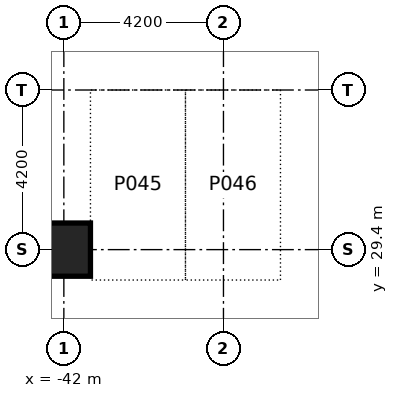
"""IFC4 building model, lengths in metres.
Left out: names, types, materials, properties, quantities, classifications, styles, units other than length and angle.
Written with IfcOpenShell. Run it as: python <this file> out.ifc"""

import sys

from ifc_helpers import new_model, si_unit, direction, frame, origin, origin_2d, place, context, subcontext, project, spatial, rectangle, extrude, element, save


model = new_model("IFC4")
c1 = context("Model", 3, precision=1e-05, world=origin(), true_north=direction((0.0, 1.0)))
c2 = subcontext(c1, "Body", "Model", "MODEL_VIEW")
j1 = project(units=[si_unit("LENGTHUNIT", "METRE"), si_unit("PLANEANGLEUNIT", "RADIAN")], contexts=[c1])
p1 = place(None, origin())
s1 = spatial("IfcSite", under=j1, at=p1, CompositionType="ELEMENT")
p2 = place(p1, origin())
s2 = spatial("IfcBuilding", under=s1, at=p2, CompositionType="ELEMENT")
p3 = place(p2, frame((0.0, 0.0, -4.2)))
s3 = spatial("IfcBuildingStorey", under=s2, at=p3, CompositionType="ELEMENT", Elevation=-4.2)
p4 = place(p3, frame((-42.0, 29.4, 0.0), z_axis=(0.0, 0.0, 1.0), x_axis=(1.0, 0.0, 0.0)))
e1 = element("IfcColumn", 1, at=p4, inside=s3, PredefinedType="COLUMN", context=c2, shape_type="SweptSolid", body=[
    extrude(rectangle(XDim=1.4, YDim=1.4, at=origin_2d()), origin(), (0.0, 0.0, 1.0), 3.75),
])
save(model, sys.argv[1])
